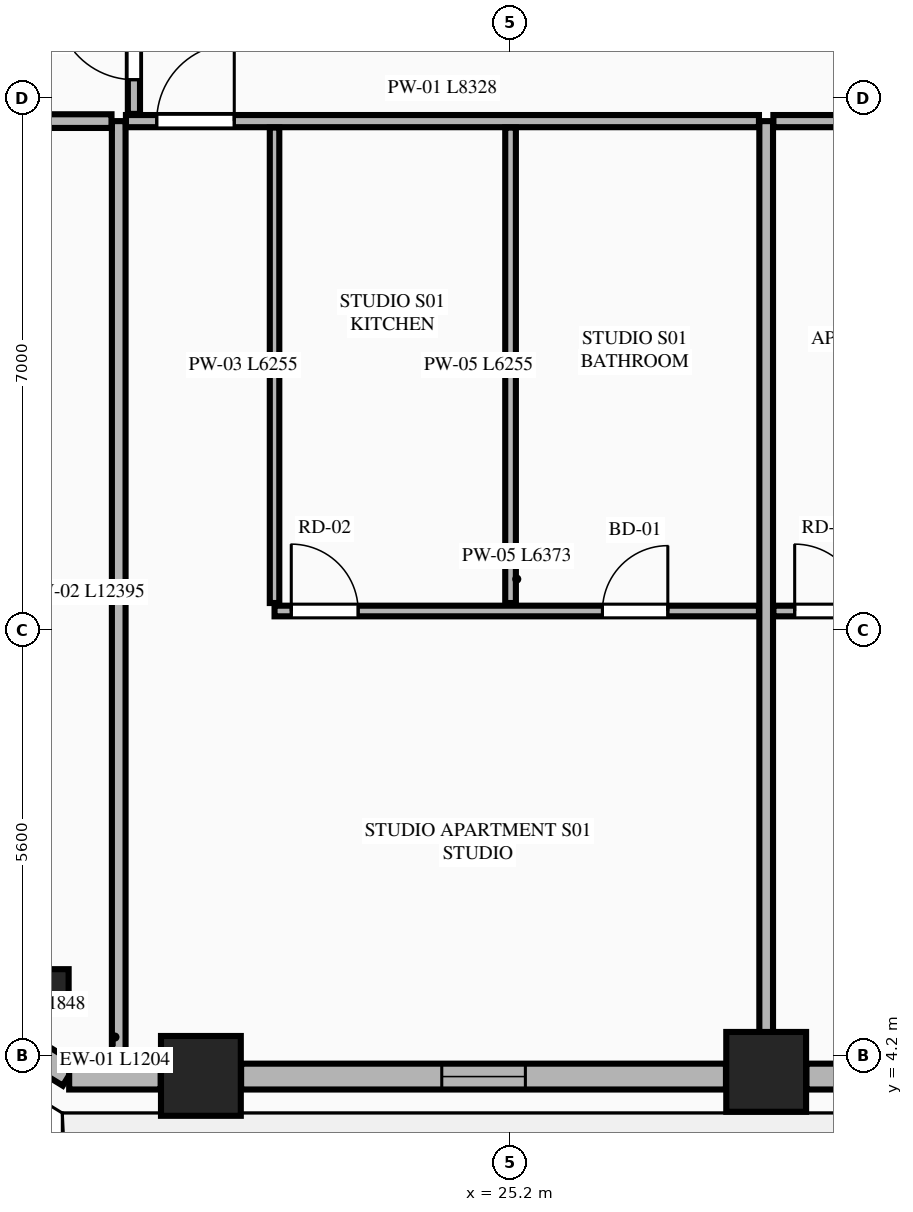
"""IFC4 building model, lengths in metres.
Left out: names, types, materials, properties, quantities, classifications, styles, units other than length and angle.
Written with IfcOpenShell. Run it as: python <this file> out.ifc"""

import sys

from ifc_helpers import new_model, si_unit, direction, frame, frame_2d, origin, origin_2d, place, context, subcontext, project, spatial, rectangle, extrude, element, fill, save


model = new_model("IFC4")
c1 = context("Model", 3, precision=1e-05, world=origin(), true_north=direction((0.0, 1.0)))
c2 = subcontext(c1, "Body", "Model", "MODEL_VIEW")
j1 = project(units=[si_unit("LENGTHUNIT", "METRE"), si_unit("PLANEANGLEUNIT", "RADIAN")], contexts=[c1])
p1 = place(None, origin())
s1 = spatial("IfcSite", under=j1, at=p1, CompositionType="ELEMENT")
p2 = place(p1, origin())
s2 = spatial("IfcBuilding", under=s1, at=p2, CompositionType="ELEMENT")
p3 = place(p2, frame((0.0, 0.0, 130.35)))
s3 = spatial("IfcBuildingStorey", under=s2, at=p3, CompositionType="ELEMENT", Elevation=130.35)
for number, where, z_axis, x_axis in (
    (1, (21.131, 3.939, 0.0), (0.0, 0.0, 1.0), (1.0, 0.0, 0.0)),
    (2, (28.568, 3.992, 0.0), (0.0, 0.0, 1.0), (1.0, 0.0, 0.0)),
):
    element("IfcColumn", number, at=place(p3, frame(where, z_axis=z_axis, x_axis=x_axis)), inside=s3, PredefinedType="COLUMN", context=c2, shape_type="SweptSolid", body=[
        extrude(rectangle(XDim=1.05, YDim=1.05, at=origin_2d()), origin(), (0.0, 0.0, 1.0), 3.55),
    ])
p4 = place(p3, frame((19.141, 5.093, 0.0), z_axis=(0.0, 0.0, 1.0), x_axis=(0.865160173452, -0.501495637342, 0.0)))
e3 = element("IfcColumn", 3, at=p4, inside=s3, PredefinedType="PILASTER", context=c2, shape_type="SweptSolid", body=[
    extrude(rectangle(XDim=0.5, YDim=0.35, at=origin_2d()), origin(), (0.0, 0.0, 1.0), 3.55),
])
p5 = place(p3, frame((17.829, 4.923, 0.0), z_axis=(0.0, 0.0, 1.0), x_axis=(0.851798915137, -0.523868884523, 0.0)))
e4 = element("IfcWall", 4, at=p5, inside=s3, PredefinedType="STANDARD", context=c2, shape_type="SweptSolid", body=[
    extrude(rectangle(XDim=1.848, YDim=0.34, at=frame_2d((0.924, 0.0))), origin(), (0.0, 0.0, 1.0), 3.34),
])
p6 = place(p3, frame((19.398, 3.93, 0.0), z_axis=(0.0, 0.0, 1.0), x_axis=(1.0, 0.0, 0.0)))
e5 = element("IfcWall", 5, at=p6, inside=s3, PredefinedType="STANDARD", context=c2, shape_type="SweptSolid", body=[
    extrude(rectangle(XDim=1.204, YDim=0.34, at=frame_2d((0.602, 0.0))), origin(), (0.0, 0.0, 1.0), 3.34),
])
p7 = place(p3, frame((21.66, 3.93, 0.0), z_axis=(0.0, 0.0, 1.0), x_axis=(1.0, 0.0, 0.0)))
e6 = element("IfcWall", 6, at=p7, inside=s3, PredefinedType="STANDARD", context=c2, shape_type="SweptSolid", body=[
    extrude(rectangle(XDim=6.379, YDim=0.34, at=frame_2d((3.189, 0.0))), origin(), (0.0, 0.0, 1.0), 2.797),
])
p8 = place(p7, frame((2.64, 0.0, 0.75)))
e7 = element("IfcOpeningElement", 7, at=p8, cuts=e6, PredefinedType="OPENING", context=c2, shape_type="SweptSolid", body=[
    extrude(rectangle(XDim=1.1, YDim=1.897, at=frame_2d((0.55, 0.948))), frame((0.0, 0.18, 0.0), z_axis=(0.0, -1.0, 0.0), x_axis=(1.0, 0.0, 0.0)), (0.0, 0.0, 1.0), 0.36),
])
p9 = place(p3, frame((29.097, 3.93, 0.0), z_axis=(0.0, 0.0, 1.0), x_axis=(1.0, 0.0, 0.0)))
e8 = element("IfcWall", 8, at=p9, inside=s3, PredefinedType="STANDARD", context=c2, shape_type="SweptSolid", body=[
    extrude(rectangle(XDim=6.606, YDim=0.34, at=frame_2d((3.303, 0.0))), origin(), (0.0, 0.0, 1.0), 2.797),
])
p10 = place(p9, frame((2.201, 0.0, 0.0)))
e9 = element("IfcOpeningElement", 9, at=p10, cuts=e8, PredefinedType="OPENING", context=c2, shape_type="SweptSolid", body=[
    extrude(rectangle(XDim=1.1, YDim=2.25, at=frame_2d((0.55, 1.125))), frame((0.0, 0.18, 0.0), z_axis=(0.0, -1.0, 0.0), x_axis=(1.0, 0.0, 0.0)), (0.0, 0.0, 1.0), 0.36),
])
p11 = place(p3, frame((20.05, 4.105, 0.0), z_axis=(0.0, 0.0, 1.0), x_axis=(0.0, 1.0, 0.0)))
e10 = element("IfcWall", 10, at=p11, inside=s3, PredefinedType="PARTITIONING", context=c2, shape_type="SweptSolid", body=[
    extrude(rectangle(XDim=12.395, YDim=0.18, at=frame_2d((6.198, 0.0))), origin(), (0.0, 0.0, 1.0), 3.34),
])
p12 = place(p3, frame((28.568, 4.105, 0.0), z_axis=(0.0, 0.0, 1.0), x_axis=(0.0, 1.0, 0.0)))
e11 = element("IfcWall", 11, at=p12, inside=s3, PredefinedType="PARTITIONING", context=c2, shape_type="SweptSolid", body=[
    extrude(rectangle(XDim=12.395, YDim=0.18, at=frame_2d((6.198, 0.0))), origin(), (0.0, 0.0, 1.0), 2.722),
])
p13 = place(p3, frame((20.145, 16.5, 0.0), z_axis=(0.0, 0.0, 1.0), x_axis=(1.0, 0.0, 0.0)))
e12 = element("IfcWall", 12, at=p13, inside=s3, PredefinedType="PARTITIONING", context=c2, shape_type="SweptSolid", body=[
    extrude(rectangle(XDim=8.328, YDim=0.16, at=frame_2d((4.164, 0.0))), origin(), (0.0, 0.0, 1.0), 3.34),
])
p14 = place(p13, frame((0.405, 0.0, 0.0)))
e13 = element("IfcOpeningElement", 13, at=p14, cuts=e12, PredefinedType="OPENING", context=c2, shape_type="SweptSolid", body=[
    extrude(rectangle(XDim=1.02, YDim=2.25, at=frame_2d((0.51, 1.125))), frame((0.0, 0.09, 0.0), z_axis=(0.0, -1.0, 0.0), x_axis=(1.0, 0.0, 0.0)), (0.0, 0.0, 1.0), 0.18),
])
p15 = place(p3, frame((22.1, 10.16, 0.0), z_axis=(0.0, 0.0, 1.0), x_axis=(0.0, 1.0, 0.0)))
e14 = element("IfcWall", 14, at=p15, inside=s3, PredefinedType="PARTITIONING", context=c2, shape_type="SweptSolid", body=[
    extrude(rectangle(XDim=6.255, YDim=0.125, at=frame_2d((3.127, 0.0))), origin(), (0.0, 0.0, 1.0), 2.722),
])
p16 = place(p3, frame((22.1, 10.055, 0.0), z_axis=(0.0, 0.0, 1.0), x_axis=(1.0, 0.0, 0.0)))
e15 = element("IfcWall", 15, at=p16, inside=s3, PredefinedType="PLUMBINGWALL", context=c2, shape_type="SweptSolid", body=[
    extrude(rectangle(XDim=6.373, YDim=0.14, at=frame_2d((3.187, 0.0))), origin(), (0.0, 0.0, 1.0), 3.34),
])
p17 = place(p16, frame((4.314, 0.0, 0.0)))
e16 = element("IfcOpeningElement", 16, at=p17, cuts=e15, PredefinedType="OPENING", context=c2, shape_type="SweptSolid", body=[
    extrude(rectangle(XDim=0.86, YDim=2.1, at=frame_2d((0.43, 1.05))), frame((0.0, 0.08, 0.0), z_axis=(0.0, -1.0, 0.0), x_axis=(1.0, 0.0, 0.0)), (0.0, 0.0, 1.0), 0.16),
])
p18 = place(p16, frame((0.22, 0.0, 0.0)))
e17 = element("IfcOpeningElement", 17, at=p18, cuts=e15, PredefinedType="OPENING", context=c2, shape_type="SweptSolid", body=[
    extrude(rectangle(XDim=0.88, YDim=2.15, at=frame_2d((0.44, 1.075))), frame((0.0, 0.08, 0.0), z_axis=(0.0, -1.0, 0.0), x_axis=(1.0, 0.0, 0.0)), (0.0, 0.0, 1.0), 0.16),
])
p19 = place(p3, frame((25.205, 10.16, 0.0), z_axis=(0.0, 0.0, 1.0), x_axis=(0.0, 1.0, 0.0)))
e18 = element("IfcWall", 18, at=p19, inside=s3, PredefinedType="PLUMBINGWALL", context=c2, shape_type="SweptSolid", body=[
    extrude(rectangle(XDim=6.255, YDim=0.14, at=frame_2d((3.127, 0.0))), origin(), (0.0, 0.0, 1.0), 3.34),
])
p20 = place(p3, frame((28.663, 16.5, 0.0), z_axis=(0.0, 0.0, 1.0), x_axis=(1.0, 0.0, 0.0)))
e19 = element("IfcWall", 19, at=p20, inside=s3, PredefinedType="PARTITIONING", context=c2, shape_type="SweptSolid", body=[
    extrude(rectangle(XDim=15.992, YDim=0.16, at=frame_2d((7.996, 0.0))), origin(), (0.0, 0.0, 1.0), 3.34),
])
p21 = place(p20, frame((14.087, 0.0, 0.0)))
e20 = element("IfcOpeningElement", 20, at=p21, cuts=e19, PredefinedType="OPENING", context=c2, shape_type="SweptSolid", body=[
    extrude(rectangle(XDim=1.02, YDim=2.25, at=frame_2d((0.51, 1.125))), frame((0.0, 0.09, 0.0), z_axis=(0.0, -1.0, 0.0), x_axis=(1.0, 0.0, 0.0)), (0.0, 0.0, 1.0), 0.18),
])
p22 = place(p3, frame((28.663, 10.055, 0.0), z_axis=(0.0, 0.0, 1.0), x_axis=(1.0, 0.0, 0.0)))
e21 = element("IfcWall", 21, at=p22, inside=s3, PredefinedType="PLUMBINGWALL", context=c2, shape_type="SweptSolid", body=[
    extrude(rectangle(XDim=5.964, YDim=0.14, at=frame_2d((2.982, 0.0))), origin(), (0.0, 0.0, 1.0), 3.34),
])
p23 = place(p22, frame((0.28, 0.0, 0.0)))
e22 = element("IfcOpeningElement", 22, at=p23, cuts=e21, PredefinedType="OPENING", context=c2, shape_type="SweptSolid", body=[
    extrude(rectangle(XDim=0.88, YDim=2.15, at=frame_2d((0.44, 1.075))), frame((0.0, 0.08, 0.0), z_axis=(0.0, -1.0, 0.0), x_axis=(1.0, 0.0, 0.0)), (0.0, 0.0, 1.0), 0.16),
])
p24 = place(p22, frame((4.394, 0.0, 0.0)))
e23 = element("IfcOpeningElement", 23, at=p24, cuts=e21, PredefinedType="OPENING", context=c2, shape_type="SweptSolid", body=[
    extrude(rectangle(XDim=0.86, YDim=2.1, at=frame_2d((0.43, 1.05))), frame((0.0, 0.08, 0.0), z_axis=(0.0, -1.0, 0.0), x_axis=(1.0, 0.0, 0.0)), (0.0, 0.0, 1.0), 0.16),
])
p25 = place(p3, frame((12.185, 16.5, 0.0), z_axis=(0.0, 0.0, 1.0), x_axis=(1.0, 0.0, 0.0)))
e24 = element("IfcWall", 24, at=p25, inside=s3, PredefinedType="PARTITIONING", context=c2, shape_type="SweptSolid", body=[
    extrude(rectangle(XDim=7.77, YDim=0.18, at=frame_2d((3.885, 0.0))), origin(), (0.0, 0.0, 1.0), 3.34),
])
p26 = place(p3, frame((20.25, 16.595, 0.0), z_axis=(0.0, 0.0, 1.0), x_axis=(0.0, 1.0, 0.0)))
e25 = element("IfcWall", 25, at=p26, inside=s3, PredefinedType="PARTITIONING", context=c2, shape_type="SweptSolid", body=[
    extrude(rectangle(XDim=18.61, YDim=0.16, at=frame_2d((9.305, 0.0))), origin(), (0.0, 0.0, 1.0), 3.34),
])
p27 = place(p26, frame((0.45, 0.0, 0.0)))
e26 = element("IfcOpeningElement", 26, at=p27, cuts=e25, PredefinedType="OPENING", context=c2, shape_type="SweptSolid", body=[
    extrude(rectangle(XDim=1.02, YDim=2.25, at=frame_2d((0.51, 1.125))), frame((0.0, 0.09, 0.0), z_axis=(0.0, -1.0, 0.0), x_axis=(1.0, 0.0, 0.0)), (0.0, 0.0, 1.0), 0.18),
])
p28 = place(p8, origin())
e27 = element("IfcWindow", 27, at=p28, inside=s3, PartitioningType="SINGLE_PANEL", PredefinedType="WINDOW", context=c2, shape_type="SweptSolid", body=[
    extrude(rectangle(XDim=1.1, YDim=1.897, at=frame_2d((0.55, 0.948))), frame((0.0, 0.03, 0.0), z_axis=(0.0, -1.0, 0.0), x_axis=(1.0, 0.0, 0.0)), (0.0, 0.0, 1.0), 0.06),
])
fill(e7, e27)
p29 = place(p17, origin())
e28 = element("IfcDoor", 28, at=p29, inside=s3, OperationType="SINGLE_SWING_RIGHT", PredefinedType="DOOR", context=c2, shape_type="SweptSolid", body=[
    extrude(rectangle(XDim=0.86, YDim=2.1, at=frame_2d((0.43, 1.05))), frame((0.0, 0.025, 0.0), z_axis=(0.0, -1.0, 0.0), x_axis=(1.0, 0.0, 0.0)), (0.0, 0.0, 1.0), 0.05),
])
fill(e16, e28)
p30 = place(p14, origin())
e29 = element("IfcDoor", 29, at=p30, inside=s3, OperationType="SINGLE_SWING_RIGHT", PredefinedType="DOOR", context=c2, shape_type="SweptSolid", body=[
    extrude(rectangle(XDim=1.02, YDim=2.25, at=frame_2d((0.51, 1.125))), frame((0.0, 0.025, 0.0), z_axis=(0.0, -1.0, 0.0), x_axis=(1.0, 0.0, 0.0)), (0.0, 0.0, 1.0), 0.05),
])
fill(e13, e29)
p31 = place(p18, origin())
e30 = element("IfcDoor", 30, at=p31, inside=s3, OperationType="SINGLE_SWING_LEFT", PredefinedType="DOOR", context=c2, shape_type="SweptSolid", body=[
    extrude(rectangle(XDim=0.88, YDim=2.15, at=frame_2d((0.44, 1.075))), frame((0.0, 0.025, 0.0), z_axis=(0.0, -1.0, 0.0), x_axis=(1.0, 0.0, 0.0)), (0.0, 0.0, 1.0), 0.05),
])
fill(e17, e30)
p32 = place(p23, origin())
e31 = element("IfcDoor", 31, at=p32, inside=s3, OperationType="SINGLE_SWING_LEFT", PredefinedType="DOOR", context=c2, shape_type="SweptSolid", body=[
    extrude(rectangle(XDim=0.88, YDim=2.15, at=frame_2d((0.44, 1.075))), frame((0.0, 0.025, 0.0), z_axis=(0.0, -1.0, 0.0), x_axis=(1.0, 0.0, 0.0)), (0.0, 0.0, 1.0), 0.05),
])
fill(e22, e31)
p33 = place(p27, origin())
e32 = element("IfcDoor", 32, at=p33, inside=s3, OperationType="SINGLE_SWING_RIGHT", PredefinedType="DOOR", context=c2, shape_type="SweptSolid", body=[
    extrude(rectangle(XDim=1.02, YDim=2.25, at=frame_2d((0.51, 1.125))), frame((0.0, 0.025, 0.0), z_axis=(0.0, -1.0, 0.0), x_axis=(1.0, 0.0, 0.0)), (0.0, 0.0, 1.0), 0.05),
])
fill(e26, e32)
save(model, sys.argv[1])
